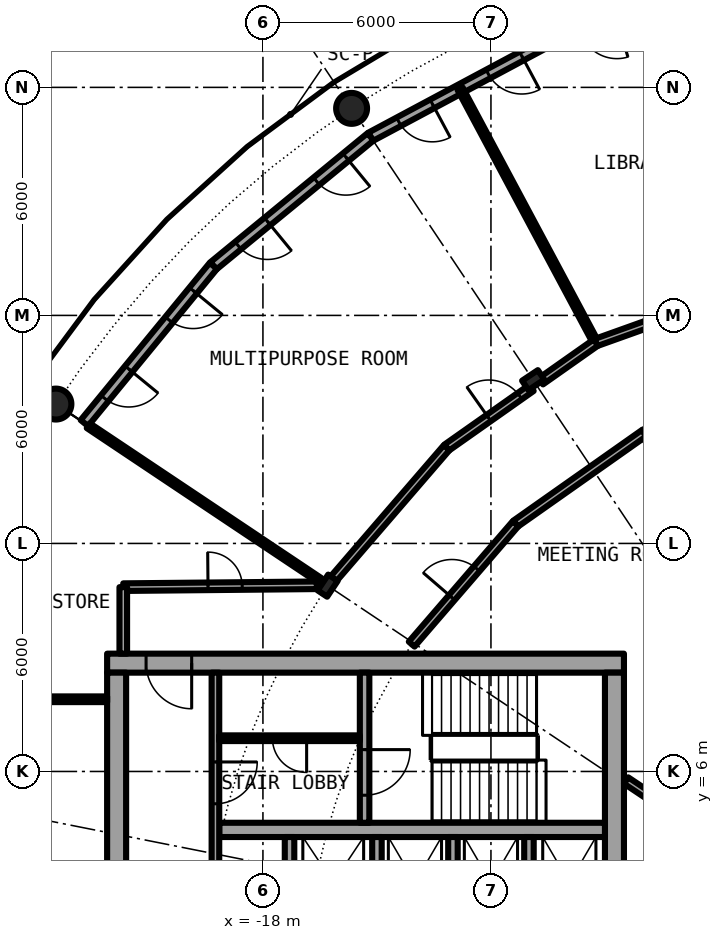
"""IFC4 building model, lengths in metres.
Left out: names, types, materials, properties, quantities, classifications, styles, units other than length and angle.
Written with IfcOpenShell. Run it as: python <this file> out.ifc"""

import sys

from ifc_helpers import new_model, si_unit, direction, frame, frame_2d, origin, origin_2d, place, context, subcontext, project, spatial, rectangle, hollow_circle, i_section, extrude, element, fill, save


model = new_model("IFC4")
c1 = context("Model", 3, precision=1e-05, world=origin(), true_north=direction((0.0, 1.0)))
c2 = subcontext(c1, "Body", "Model", "MODEL_VIEW")
j1 = project(units=[si_unit("LENGTHUNIT", "METRE"), si_unit("PLANEANGLEUNIT", "RADIAN")], contexts=[c1])
p1 = place(None, origin())
s1 = spatial("IfcSite", under=j1, at=p1, CompositionType="ELEMENT")
p2 = place(p1, origin())
s2 = spatial("IfcBuilding", under=s1, at=p2, CompositionType="ELEMENT")
p3 = place(p2, frame((0.0, 0.0, 157.4)))
s3 = spatial("IfcBuildingStorey", under=s2, at=p3, CompositionType="ELEMENT", Elevation=157.4)
for number, where, z_axis, x_axis in (
    (1, (-15.667, 23.448, 0.0), (0.0, 0.0, 1.0), (1.0, 0.0, 0.0)),
    (2, (-23.448, 15.667, 0.0), (0.0, 0.0, 1.0), (1.0, 0.0, 0.0)),
):
    element("IfcColumn", number, at=place(p3, frame(where, z_axis=z_axis, x_axis=x_axis)), inside=s3, PredefinedType="COLUMN", context=c2, shape_type="SweptSolid", body=[
        extrude(hollow_circle(Radius=0.406, WallThickness=0.04, at=origin_2d()), origin(), (0.0, 0.0, 1.0), 4.2),
    ])
for number, where, z_axis, x_axis in (
    (3, (-10.889, 16.297, 0.0), (0.0, 0.0, 1.0), (-0.556, 0.831, 0.0)),
    (4, (-16.297, 10.889, 0.0), (0.0, 0.0, 1.0), (-0.831, 0.556, 0.0)),
):
    element("IfcColumn", number, at=place(p3, frame(where, z_axis=z_axis, x_axis=x_axis)), inside=s3, PredefinedType="COLUMN", context=c2, shape_type="SweptSolid", body=[
        extrude(i_section(OverallWidth=0.3, OverallDepth=0.5, WebThickness=0.014, FlangeThickness=0.028, FilletRadius=0.027, at=origin_2d()), origin(), (0.0, 0.0, 1.0), 4.2),
    ])
p4 = place(p3, frame((-10.447, 25.222, 0.0), z_axis=(0.0, 0.0, 1.0), x_axis=(-0.881915646801, -0.471407246368, 0.0)))
e5 = element("IfcWall", 5, at=p4, inside=s3, PredefinedType="SOLIDWALL", context=c2, shape_type="SweptSolid", body=[
    extrude(rectangle(XDim=5.352, YDim=0.25, at=frame_2d((2.676, 0.0))), origin(), (0.0, 0.0, 1.0), 3.85),
])
p5 = place(p4, frame((0.841, 0.0, 0.0)))
e6 = element("IfcOpeningElement", 6, at=p5, cuts=e5, PredefinedType="OPENING", context=c2, shape_type="SweptSolid", body=[
    extrude(rectangle(XDim=1.0, YDim=2.2, at=frame_2d((0.5, 1.1))), frame((0.0, 0.135, 0.0), z_axis=(0.0, -1.0, 0.0), x_axis=(1.0, 0.0, 0.0)), (0.0, 0.0, 1.0), 0.27),
])
p6 = place(p4, frame((3.51, 0.0, 0.0)))
e7 = element("IfcOpeningElement", 7, at=p6, cuts=e5, PredefinedType="OPENING", context=c2, shape_type="SweptSolid", body=[
    extrude(rectangle(XDim=1.0, YDim=2.2, at=frame_2d((0.5, 1.1))), frame((0.0, 0.135, 0.0), z_axis=(0.0, -1.0, 0.0), x_axis=(1.0, 0.0, 0.0)), (0.0, 0.0, 1.0), 0.27),
])
p7 = place(p3, frame((-15.167, 22.699, 0.0), z_axis=(0.0, 0.0, 1.0), x_axis=(-0.773019449054, -0.634382322723, 0.0)))
e8 = element("IfcWall", 8, at=p7, inside=s3, PredefinedType="SOLIDWALL", context=c2, shape_type="SweptSolid", body=[
    extrude(rectangle(XDim=5.352, YDim=0.25, at=frame_2d((2.676, 0.0))), origin(), (0.0, 0.0, 1.0), 3.85),
])
p8 = place(p7, frame((0.841, 0.0, 0.0)))
e9 = element("IfcOpeningElement", 9, at=p8, cuts=e8, PredefinedType="OPENING", context=c2, shape_type="SweptSolid", body=[
    extrude(rectangle(XDim=1.0, YDim=2.2, at=frame_2d((0.5, 1.1))), frame((0.0, 0.135, 0.0), z_axis=(0.0, -1.0, 0.0), x_axis=(1.0, 0.0, 0.0)), (0.0, 0.0, 1.0), 0.27),
])
p9 = place(p7, frame((3.51, 0.0, 0.0)))
e10 = element("IfcOpeningElement", 10, at=p9, cuts=e8, PredefinedType="OPENING", context=c2, shape_type="SweptSolid", body=[
    extrude(rectangle(XDim=1.0, YDim=2.2, at=frame_2d((0.5, 1.1))), frame((0.0, 0.135, 0.0), z_axis=(0.0, -1.0, 0.0), x_axis=(1.0, 0.0, 0.0)), (0.0, 0.0, 1.0), 0.27),
])
p10 = place(p3, frame((-19.304, 19.304, 0.0), z_axis=(0.0, 0.0, 1.0), x_axis=(-0.634382322723, -0.773019449054, 0.0)))
e11 = element("IfcWall", 11, at=p10, inside=s3, PredefinedType="SOLIDWALL", context=c2, shape_type="SweptSolid", body=[
    extrude(rectangle(XDim=5.352, YDim=0.25, at=frame_2d((2.676, 0.0))), origin(), (0.0, 0.0, 1.0), 3.85),
])
p11 = place(p10, frame((0.841, 0.0, 0.0)))
e12 = element("IfcOpeningElement", 12, at=p11, cuts=e11, PredefinedType="OPENING", context=c2, shape_type="SweptSolid", body=[
    extrude(rectangle(XDim=1.0, YDim=2.2, at=frame_2d((0.5, 1.1))), frame((0.0, 0.135, 0.0), z_axis=(0.0, -1.0, 0.0), x_axis=(1.0, 0.0, 0.0)), (0.0, 0.0, 1.0), 0.27),
])
p12 = place(p10, frame((3.51, 0.0, 0.0)))
e13 = element("IfcOpeningElement", 13, at=p12, cuts=e11, PredefinedType="OPENING", context=c2, shape_type="SweptSolid", body=[
    extrude(rectangle(XDim=1.0, YDim=2.2, at=frame_2d((0.5, 1.1))), frame((0.0, 0.135, 0.0), z_axis=(0.0, -1.0, 0.0), x_axis=(1.0, 0.0, 0.0)), (0.0, 0.0, 1.0), 0.27),
])
p13 = place(p3, frame((-8.5, 8.85, 0.0), z_axis=(0.0, 0.0, 1.0), x_axis=(-1.0, 0.0, 0.0)))
e14 = element("IfcWall", 14, at=p13, inside=s3, PredefinedType="SHEAR", context=c2, shape_type="SweptSolid", body=[
    extrude(rectangle(XDim=13.6, YDim=0.5, at=frame_2d((6.8, 0.0))), origin(), (0.0, 0.0, 1.0), 4.2),
])
p14 = place(p13, frame((11.375, 0.0, 0.0)))
e15 = element("IfcOpeningElement", 15, at=p14, cuts=e14, PredefinedType="OPENING", context=c2, shape_type="SweptSolid", body=[
    extrude(rectangle(XDim=1.2, YDim=2.3, at=frame_2d((0.6, 1.15))), frame((0.0, 0.26, 0.0), z_axis=(0.0, -1.0, 0.0), x_axis=(1.0, 0.0, 0.0)), (0.0, 0.0, 1.0), 0.52),
])
p15 = place(p3, frame((-21.85, -8.6, 0.0), z_axis=(0.0, 0.0, 1.0), x_axis=(0.0, 1.0, 0.0)))
e16 = element("IfcWall", 16, at=p15, inside=s3, PredefinedType="SHEAR", context=c2, shape_type="SweptSolid", body=[
    extrude(rectangle(XDim=17.2, YDim=0.5, at=frame_2d((8.6, 0.0))), origin(), (0.0, 0.0, 1.0), 4.2),
])
p16 = place(p15, frame((7.7, 0.0, 0.0)))
e17 = element("IfcOpeningElement", 17, at=p16, cuts=e16, PredefinedType="OPENING", context=c2, shape_type="SweptSolid", body=[
    extrude(rectangle(XDim=1.8, YDim=2.3, at=frame_2d((0.9, 1.15))), frame((0.0, 0.26, 0.0), z_axis=(0.0, -1.0, 0.0), x_axis=(1.0, 0.0, 0.0)), (0.0, 0.0, 1.0), 0.52),
])
p17 = place(p3, frame((-8.75, 8.6, 0.0), z_axis=(0.0, 0.0, 1.0), x_axis=(0.0, -1.0, 0.0)))
e18 = element("IfcWall", 18, at=p17, inside=s3, PredefinedType="SHEAR", context=c2, shape_type="SweptSolid", body=[
    extrude(rectangle(XDim=17.2, YDim=0.5, at=frame_2d((8.6, 0.0))), origin(), (0.0, 0.0, 1.0), 4.2),
])
p18 = place(p17, frame((7.4, 0.0, 0.1)))
e19 = element("IfcOpeningElement", 19, at=p18, cuts=e18, PredefinedType="OPENING", context=c2, shape_type="SweptSolid", body=[
    extrude(rectangle(XDim=2.4, YDim=2.2, at=frame_2d((1.2, 1.1))), frame((0.0, 0.26, 0.0), z_axis=(0.0, -1.0, 0.0), x_axis=(1.0, 0.0, 0.0)), (0.0, 0.0, 1.0), 0.52),
])
p19 = place(p3, frame((-9.0, 4.462, 0.0), z_axis=(0.0, 0.0, 1.0), x_axis=(-1.0, 0.0, 0.0)))
e20 = element("IfcWall", 20, at=p19, inside=s3, PredefinedType="SHEAR", context=c2, shape_type="SweptSolid", body=[
    extrude(rectangle(XDim=10.15, YDim=0.375, at=frame_2d((5.075, 0.0))), origin(), (0.0, 0.0, 1.0), 4.2),
])
p20 = place(p3, frame((-15.325, 8.6, 0.0), z_axis=(0.0, 0.0, 1.0), x_axis=(0.0, -1.0, 0.0)))
e21 = element("IfcWall", 21, at=p20, inside=s3, PredefinedType="SHEAR", context=c2, shape_type="SweptSolid", body=[
    extrude(rectangle(XDim=3.95, YDim=0.25, at=frame_2d((1.975, 0.0))), origin(), (0.0, 0.0, 1.0), 4.2),
])
p21 = place(p20, frame((2.025, 0.0, 0.0)))
e22 = element("IfcOpeningElement", 22, at=p21, cuts=e21, PredefinedType="OPENING", context=c2, shape_type="SweptSolid", body=[
    extrude(rectangle(XDim=1.2, YDim=2.3, at=frame_2d((0.6, 1.15))), frame((0.0, 0.135, 0.0), z_axis=(0.0, -1.0, 0.0), x_axis=(1.0, 0.0, 0.0)), (0.0, 0.0, 1.0), 0.27),
])
for number, where, z_axis, x_axis in (
    (23, (-15.0, 1.825, 0.0), (0.0, 0.0, 1.0), (0.0, 1.0, 0.0)),
    (24, (-17.3, 1.825, 0.0), (0.0, 0.0, 1.0), (0.0, 1.0, 0.0)),
):
    element("IfcWall", number, at=place(p3, frame(where, z_axis=z_axis, x_axis=x_axis)), inside=s3, PredefinedType="SOLIDWALL", context=c2, shape_type="SweptSolid", body=[
        extrude(rectangle(XDim=2.45, YDim=0.25, at=frame_2d((1.225, 0.0))), origin(), (0.0, 0.0, 1.0), 3.85),
    ])
p22 = place(p3, frame((-19.25, 8.6, 0.0), z_axis=(0.0, 0.0, 1.0), x_axis=(0.0, -1.0, 0.0)))
e25 = element("IfcWall", 25, at=p22, inside=s3, PredefinedType="SOLIDWALL", context=c2, shape_type="SweptSolid", body=[
    extrude(rectangle(XDim=7.025, YDim=0.2, at=frame_2d((3.513, 0.0))), origin(), (0.0, 0.0, 1.0), 3.85),
])
p23 = place(p22, frame((2.35, 0.0, 0.0)))
e26 = element("IfcOpeningElement", 26, at=p23, cuts=e25, PredefinedType="OPENING", context=c2, shape_type="SweptSolid", body=[
    extrude(rectangle(XDim=1.1, YDim=2.3, at=frame_2d((0.55, 1.15))), frame((0.0, 0.11, 0.0), z_axis=(0.0, -1.0, 0.0), x_axis=(1.0, 0.0, 0.0)), (0.0, 0.0, 1.0), 0.22),
])
for number, where, z_axis, x_axis in (
    (27, (-11.0, 1.825, 0.0), (0.0, 0.0, 1.0), (0.0, 1.0, 0.0)),
    (28, (-13.0, 1.825, 0.0), (0.0, 0.0, 1.0), (0.0, 1.0, 0.0)),
):
    element("IfcWall", number, at=place(p3, frame(where, z_axis=z_axis, x_axis=x_axis)), inside=s3, PredefinedType="SOLIDWALL", context=c2, shape_type="SweptSolid", body=[
        extrude(rectangle(XDim=2.45, YDim=0.25, at=frame_2d((1.225, 0.0))), origin(), (0.0, 0.0, 1.0), 3.85),
    ])
p24 = place(p3, frame((-15.45, 6.875, 0.0), z_axis=(0.0, 0.0, 1.0), x_axis=(-1.0, 0.0, 0.0)))
e29 = element("IfcWall", 29, at=p24, inside=s3, PredefinedType="PARTITIONING", context=c2, shape_type="SweptSolid", body=[
    extrude(rectangle(XDim=3.7, YDim=0.15, at=frame_2d((1.85, 0.0))), origin(), (0.0, 0.0, 1.0), 3.85),
])
p25 = place(p24, frame((1.4, 0.0, 0.0)))
e30 = element("IfcOpeningElement", 30, at=p25, cuts=e29, PredefinedType="OPENING", context=c2, shape_type="SweptSolid", body=[
    extrude(rectangle(XDim=0.9, YDim=2.3, at=frame_2d((0.45, 1.15))), frame((0.0, 0.085, 0.0), z_axis=(0.0, -1.0, 0.0), x_axis=(1.0, 0.0, 0.0)), (0.0, 0.0, 1.0), 0.17),
])
p26 = place(p3, frame((-22.1, 7.9, 0.0), z_axis=(0.0, 0.0, 1.0), x_axis=(-1.0, 0.0, 0.0)))
e31 = element("IfcWall", 31, at=p26, inside=s3, PredefinedType="PARTITIONING", context=c2, shape_type="SweptSolid", body=[
    extrude(rectangle(XDim=2.84, YDim=0.15, at=frame_2d((1.42, 0.0))), origin(), (0.0, 0.0, 1.0), 3.85),
])
p27 = place(p3, frame((-22.595, 15.098, 0.0), z_axis=(0.0, 0.0, 1.0), x_axis=(0.831434446288, -0.555622859075, 0.0)))
e32 = element("IfcWall", 32, at=p27, inside=s3, PredefinedType="PARTITIONING", context=c2, shape_type="SweptSolid", body=[
    extrude(rectangle(XDim=7.325, YDim=0.15, at=frame_2d((3.662, 0.0))), origin(), (0.0, 0.0, 1.0), 3.85),
])
p28 = place(p3, frame((-12.812, 23.965, 0.0), z_axis=(0.0, 0.0, 1.0), x_axis=(0.471439510802, -0.881898399848, 0.0)))
e33 = element("IfcWall", 33, at=p28, inside=s3, PredefinedType="PARTITIONING", context=c2, shape_type="SweptSolid", body=[
    extrude(rectangle(XDim=7.575, YDim=0.15, at=frame_2d((3.787, 0.0))), origin(), (0.0, 0.0, 1.0), 3.85),
])
p29 = place(p3, frame((-7.968, 14.904, 0.0), z_axis=(0.0, 0.0, 1.0), x_axis=(0.471460365694, -0.881887251059, 0.0)))
e34 = element("IfcWall", 34, at=p29, inside=s3, PredefinedType="PARTITIONING", context=c2, shape_type="SweptSolid", body=[
    extrude(rectangle(XDim=9.18, YDim=0.15, at=frame_2d((4.59, 0.0))), origin(), (0.0, 0.0, 1.0), 3.85),
])
p30 = place(p3, frame((-6.513, 4.472, 0.0), z_axis=(0.0, 0.0, 1.0), x_axis=(-0.83133816625, 0.555766905579, 0.0)))
e35 = element("IfcWall", 35, at=p30, inside=s3, PredefinedType="PARTITIONING", context=c2, shape_type="SweptSolid", body=[
    extrude(rectangle(XDim=2.323, YDim=0.2, at=frame_2d((1.162, 0.0))), origin(), (0.0, 0.0, 1.0), 3.85),
])
p31 = place(p3, frame((-21.675, 10.85, 0.0), z_axis=(0.0, 0.0, 1.0), x_axis=(0.999954045313, 0.009586827528, 0.0)))
e36 = element("IfcWall", 36, at=p31, inside=s3, PredefinedType="PARTITIONING", context=c2, shape_type="SweptSolid", body=[
    extrude(rectangle(XDim=5.093, YDim=0.2, at=frame_2d((2.547, 0.0))), origin(), (0.0, 0.0, 1.0), 3.85),
])
p32 = place(p31, frame((2.23, 0.0, 0.0)))
e37 = element("IfcOpeningElement", 37, at=p32, cuts=e36, PredefinedType="OPENING", context=c2, shape_type="SweptSolid", body=[
    extrude(rectangle(XDim=0.9, YDim=2.3, at=frame_2d((0.45, 1.15))), frame((0.0, 0.11, 0.0), z_axis=(0.0, -1.0, 0.0), x_axis=(1.0, 0.0, 0.0)), (0.0, 0.0, 1.0), 0.22),
])
p33 = place(p3, frame((-14.086, 9.35, 0.0), z_axis=(0.0, 0.0, 1.0), x_axis=(0.653273870261, 0.757121687996, 0.0)))
e38 = element("IfcWall", 38, at=p33, inside=s3, PredefinedType="PARTITIONING", context=c2, shape_type="SweptSolid", body=[
    extrude(rectangle(XDim=4.189, YDim=0.2, at=frame_2d((2.095, 0.0))), origin(), (0.0, 0.0, 1.0), 3.85),
])
p34 = place(p33, frame((1.621, 0.0, 0.0)))
e39 = element("IfcOpeningElement", 39, at=p34, cuts=e38, PredefinedType="OPENING", context=c2, shape_type="SweptSolid", body=[
    extrude(rectangle(XDim=1.0, YDim=2.3, at=frame_2d((0.5, 1.15))), frame((0.0, 0.11, 0.0), z_axis=(0.0, -1.0, 0.0), x_axis=(1.0, 0.0, 0.0)), (0.0, 0.0, 1.0), 0.22),
])
p35 = place(p3, frame((-11.349, 12.522, 0.0), z_axis=(0.0, 0.0, 1.0), x_axis=(0.817567680547, 0.575832517079, 0.0)))
e40 = element("IfcWall", 40, at=p35, inside=s3, PredefinedType="PARTITIONING", context=c2, shape_type="SweptSolid", body=[
    extrude(rectangle(XDim=4.137, YDim=0.2, at=frame_2d((2.068, 0.0))), origin(), (0.0, 0.0, 1.0), 3.85),
])
p36 = place(p3, frame((-7.967, 14.904, 0.0), z_axis=(0.0, 0.0, 1.0), x_axis=(0.932943640288, 0.360022449363, 0.0)))
e41 = element("IfcWall", 41, at=p36, inside=s3, PredefinedType="PARTITIONING", context=c2, shape_type="SweptSolid", body=[
    extrude(rectangle(XDim=4.139, YDim=0.2, at=frame_2d((2.069, 0.0))), origin(), (0.0, 0.0, 1.0), 3.85),
])
p37 = place(p36, frame((1.569, 0.0, 0.0)))
e42 = element("IfcOpeningElement", 42, at=p37, cuts=e41, PredefinedType="OPENING", context=c2, shape_type="SweptSolid", body=[
    extrude(rectangle(XDim=1.0, YDim=2.3, at=frame_2d((0.5, 1.15))), frame((0.0, 0.11, 0.0), z_axis=(0.0, -1.0, 0.0), x_axis=(1.0, 0.0, 0.0)), (0.0, 0.0, 1.0), 0.22),
])
p38 = place(p3, frame((-9.239, 17.286, 0.0), z_axis=(0.0, 0.0, 1.0), x_axis=(0.941550382061, 0.336872198379, 0.0)))
e43 = element("IfcWall", 43, at=p38, inside=s3, PredefinedType="PARTITIONING", context=c2, shape_type="SweptSolid", body=[
    extrude(rectangle(XDim=5.599, YDim=0.2, at=frame_2d((2.8, 0.0))), origin(), (0.0, 0.0, 1.0), 3.54),
])
p39 = place(p3, frame((-16.198, 11.004, 0.0), z_axis=(0.0, 0.0, 1.0), x_axis=(0.653094461639, 0.757276451619, 0.0)))
e44 = element("IfcWall", 44, at=p39, inside=s3, PredefinedType="PARTITIONING", context=c2, shape_type="SweptSolid", body=[
    extrude(rectangle(XDim=4.647, YDim=0.2, at=frame_2d((2.323, 0.0))), origin(), (0.0, 0.0, 1.0), 3.54),
])
p40 = place(p3, frame((-13.163, 14.523, 0.0), z_axis=(0.0, 0.0, 1.0), x_axis=(0.817664396292, 0.57569517545, 0.0)))
e45 = element("IfcWall", 45, at=p40, inside=s3, PredefinedType="PARTITIONING", context=c2, shape_type="SweptSolid", body=[
    extrude(rectangle(XDim=2.727, YDim=0.2, at=frame_2d((1.364, 0.0))), origin(), (0.0, 0.0, 1.0), 3.54),
])
p41 = place(p40, frame((1.35, 0.0, 0.0)))
e46 = element("IfcOpeningElement", 46, at=p41, cuts=e45, PredefinedType="OPENING", context=c2, shape_type="SweptSolid", body=[
    extrude(rectangle(XDim=1.0, YDim=2.3, at=frame_2d((0.5, 1.15))), frame((0.0, 0.11, 0.0), z_axis=(0.0, -1.0, 0.0), x_axis=(1.0, 0.0, 0.0)), (0.0, 0.0, 1.0), 0.22),
])
p42 = place(p3, frame((-10.688, 16.266, 0.0), z_axis=(0.0, 0.0, 1.0), x_axis=(0.817772792535, 0.575541188613, 0.0)))
e47 = element("IfcWall", 47, at=p42, inside=s3, PredefinedType="PARTITIONING", context=c2, shape_type="SweptSolid", body=[
    extrude(rectangle(XDim=1.772, YDim=0.2, at=frame_2d((0.886, 0.0))), origin(), (0.0, 0.0, 1.0), 3.54),
])
p43 = place(p3, frame((-21.675, 9.1, 0.0), z_axis=(0.0, 0.0, 1.0), x_axis=(0.0, 1.0, 0.0)))
e48 = element("IfcWall", 48, at=p43, inside=s3, PredefinedType="PARTITIONING", context=c2, shape_type="SweptSolid", body=[
    extrude(rectangle(XDim=1.75, YDim=0.2, at=frame_2d((0.875, 0.0))), origin(), (0.0, 0.0, 1.0), 3.85),
])
p44 = place(p5, origin())
e49 = element("IfcDoor", 49, at=p44, inside=s3, OperationType="SINGLE_SWING_LEFT", PredefinedType="DOOR", context=c2, shape_type="SweptSolid", body=[
    extrude(rectangle(XDim=1.0, YDim=2.2, at=frame_2d((0.5, 1.1))), frame((0.0, 0.025, 0.0), z_axis=(0.0, -1.0, 0.0), x_axis=(1.0, 0.0, 0.0)), (0.0, 0.0, 1.0), 0.05),
])
fill(e6, e49)
p45 = place(p6, origin())
e50 = element("IfcDoor", 50, at=p45, inside=s3, OperationType="SINGLE_SWING_LEFT", PredefinedType="DOOR", context=c2, shape_type="SweptSolid", body=[
    extrude(rectangle(XDim=1.0, YDim=2.2, at=frame_2d((0.5, 1.1))), frame((0.0, 0.025, 0.0), z_axis=(0.0, -1.0, 0.0), x_axis=(1.0, 0.0, 0.0)), (0.0, 0.0, 1.0), 0.05),
])
fill(e7, e50)
p46 = place(p8, origin())
e51 = element("IfcDoor", 51, at=p46, inside=s3, OperationType="SINGLE_SWING_LEFT", PredefinedType="DOOR", context=c2, shape_type="SweptSolid", body=[
    extrude(rectangle(XDim=1.0, YDim=2.2, at=frame_2d((0.5, 1.1))), frame((0.0, 0.025, 0.0), z_axis=(0.0, -1.0, 0.0), x_axis=(1.0, 0.0, 0.0)), (0.0, 0.0, 1.0), 0.05),
])
fill(e9, e51)
p47 = place(p9, origin())
e52 = element("IfcDoor", 52, at=p47, inside=s3, OperationType="SINGLE_SWING_LEFT", PredefinedType="DOOR", context=c2, shape_type="SweptSolid", body=[
    extrude(rectangle(XDim=1.0, YDim=2.2, at=frame_2d((0.5, 1.1))), frame((0.0, 0.025, 0.0), z_axis=(0.0, -1.0, 0.0), x_axis=(1.0, 0.0, 0.0)), (0.0, 0.0, 1.0), 0.05),
])
fill(e10, e52)
p48 = place(p11, origin())
e53 = element("IfcDoor", 53, at=p48, inside=s3, OperationType="SINGLE_SWING_LEFT", PredefinedType="DOOR", context=c2, shape_type="SweptSolid", body=[
    extrude(rectangle(XDim=1.0, YDim=2.2, at=frame_2d((0.5, 1.1))), frame((0.0, 0.025, 0.0), z_axis=(0.0, -1.0, 0.0), x_axis=(1.0, 0.0, 0.0)), (0.0, 0.0, 1.0), 0.05),
])
fill(e12, e53)
p49 = place(p12, origin())
e54 = element("IfcDoor", 54, at=p49, inside=s3, OperationType="SINGLE_SWING_LEFT", PredefinedType="DOOR", context=c2, shape_type="SweptSolid", body=[
    extrude(rectangle(XDim=1.0, YDim=2.2, at=frame_2d((0.5, 1.1))), frame((0.0, 0.025, 0.0), z_axis=(0.0, -1.0, 0.0), x_axis=(1.0, 0.0, 0.0)), (0.0, 0.0, 1.0), 0.05),
])
fill(e13, e54)
p50 = place(p25, origin())
e55 = element("IfcDoor", 55, at=p50, inside=s3, OperationType="SINGLE_SWING_LEFT", PredefinedType="DOOR", context=c2, shape_type="SweptSolid", body=[
    extrude(rectangle(XDim=0.9, YDim=2.3, at=frame_2d((0.45, 1.15))), frame((0.0, 0.025, 0.0), z_axis=(0.0, -1.0, 0.0), x_axis=(1.0, 0.0, 0.0)), (0.0, 0.0, 1.0), 0.05),
])
fill(e30, e55)
p51 = place(p21, origin())
e56 = element("IfcDoor", 56, at=p51, inside=s3, OperationType="SINGLE_SWING_LEFT", PredefinedType="DOOR", context=c2, shape_type="SweptSolid", body=[
    extrude(rectangle(XDim=1.2, YDim=2.3, at=frame_2d((0.6, 1.15))), frame((0.0, 0.025, 0.0), z_axis=(0.0, -1.0, 0.0), x_axis=(1.0, 0.0, 0.0)), (0.0, 0.0, 1.0), 0.05),
])
fill(e22, e56)
p52 = place(p23, origin())
e57 = element("IfcDoor", 57, at=p52, inside=s3, OperationType="SINGLE_SWING_RIGHT", PredefinedType="DOOR", context=c2, shape_type="SweptSolid", body=[
    extrude(rectangle(XDim=1.1, YDim=2.3, at=frame_2d((0.55, 1.15))), frame((0.0, 0.025, 0.0), z_axis=(0.0, -1.0, 0.0), x_axis=(1.0, 0.0, 0.0)), (0.0, 0.0, 1.0), 0.05),
])
fill(e26, e57)
p53 = place(p14, origin())
e58 = element("IfcDoor", 58, at=p53, inside=s3, OperationType="SINGLE_SWING_LEFT", PredefinedType="DOOR", context=c2, shape_type="SweptSolid", body=[
    extrude(rectangle(XDim=1.2, YDim=2.3, at=frame_2d((0.6, 1.15))), frame((0.0, 0.025, 0.0), z_axis=(0.0, -1.0, 0.0), x_axis=(1.0, 0.0, 0.0)), (0.0, 0.0, 1.0), 0.05),
])
fill(e15, e58)
p54 = place(p41, origin())
e59 = element("IfcDoor", 59, at=p54, inside=s3, OperationType="SINGLE_SWING_RIGHT", PredefinedType="DOOR", context=c2, shape_type="SweptSolid", body=[
    extrude(rectangle(XDim=1.0, YDim=2.3, at=frame_2d((0.5, 1.15))), frame((0.0, 0.025, 0.0), z_axis=(0.0, -1.0, 0.0), x_axis=(1.0, 0.0, 0.0)), (0.0, 0.0, 1.0), 0.05),
])
fill(e46, e59)
p55 = place(p34, origin())
e60 = element("IfcDoor", 60, at=p55, inside=s3, OperationType="SINGLE_SWING_RIGHT", PredefinedType="DOOR", context=c2, shape_type="SweptSolid", body=[
    extrude(rectangle(XDim=1.0, YDim=2.3, at=frame_2d((0.5, 1.15))), frame((0.0, 0.025, 0.0), z_axis=(0.0, -1.0, 0.0), x_axis=(1.0, 0.0, 0.0)), (0.0, 0.0, 1.0), 0.05),
])
fill(e39, e60)
p56 = place(p32, origin())
e61 = element("IfcDoor", 61, at=p56, inside=s3, OperationType="SINGLE_SWING_RIGHT", PredefinedType="DOOR", context=c2, shape_type="SweptSolid", body=[
    extrude(rectangle(XDim=0.9, YDim=2.3, at=frame_2d((0.45, 1.15))), frame((0.0, 0.025, 0.0), z_axis=(0.0, -1.0, 0.0), x_axis=(1.0, 0.0, 0.0)), (0.0, 0.0, 1.0), 0.05),
])
fill(e37, e61)
save(model, sys.argv[1])
